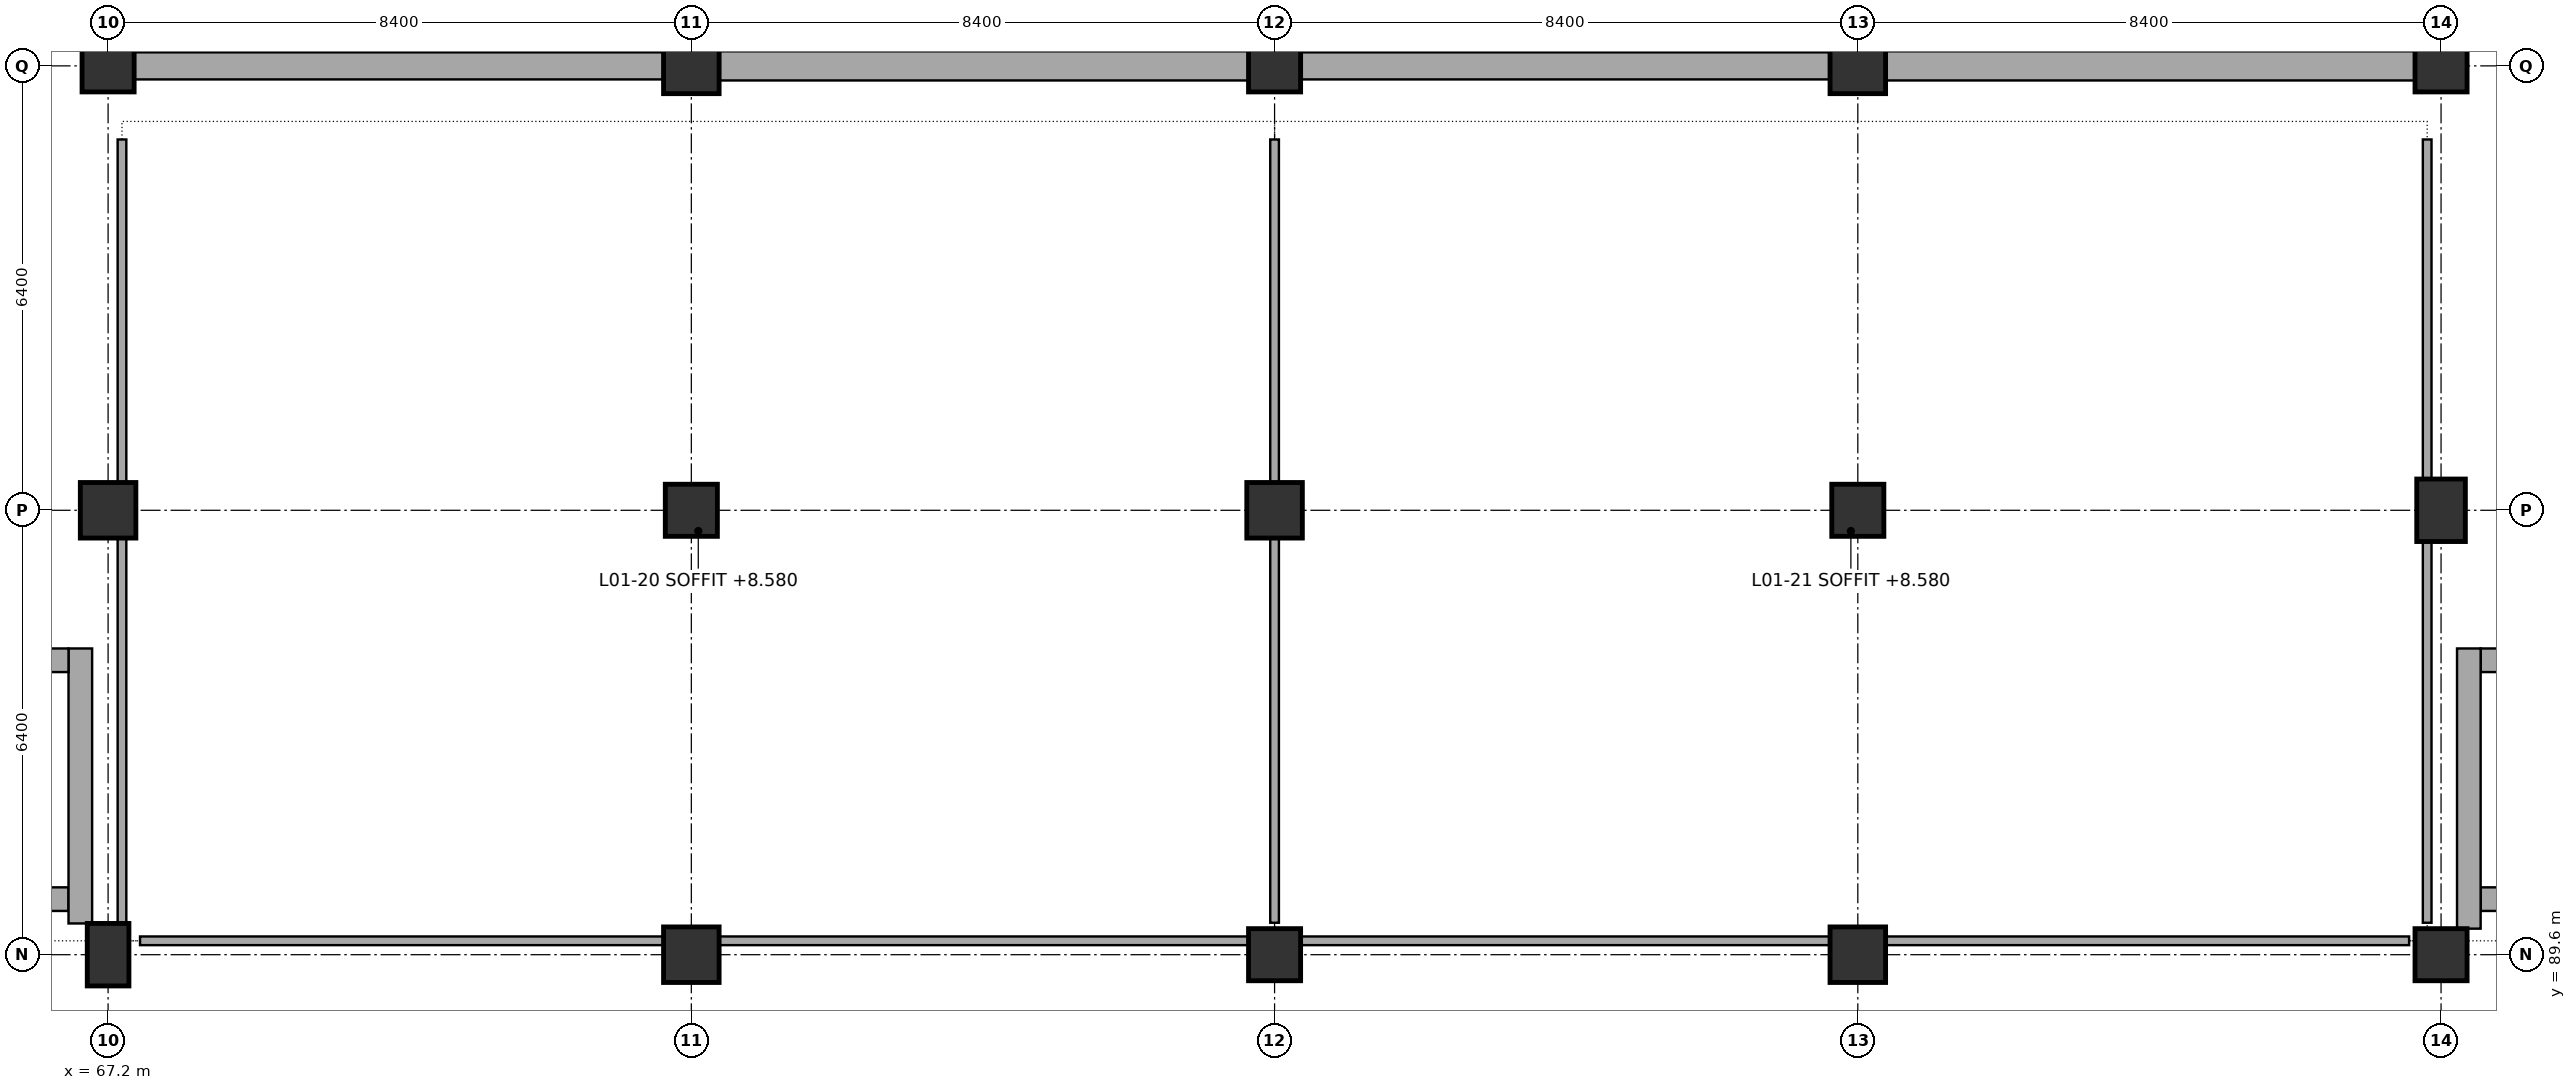
"""IFC4 building model, lengths in metres.
Left out: names, types, materials, properties, quantities, classifications, styles, units other than length and angle.
Written with IfcOpenShell. Run it as: python <this file> out.ifc"""

import sys

from ifc_helpers import new_model, si_unit, direction, frame, frame_2d, origin, origin_2d, place, context, subcontext, project, spatial, rectangle, extrude, element, fill, save


model = new_model("IFC4")
c1 = context("Model", 3, precision=1e-05, world=origin(), true_north=direction((0.0, 1.0)))
c2 = subcontext(c1, "Body", "Model", "MODEL_VIEW")
j1 = project(units=[si_unit("LENGTHUNIT", "METRE"), si_unit("PLANEANGLEUNIT", "RADIAN")], contexts=[c1])
p1 = place(None, origin())
s1 = spatial("IfcSite", under=j1, at=p1, CompositionType="ELEMENT")
p2 = place(p1, origin())
s2 = spatial("IfcBuilding", under=s1, at=p2, CompositionType="ELEMENT")
p3 = place(p2, frame((0.0, 0.0, 4.8)))
s3 = spatial("IfcBuildingStorey", under=s2, at=p3, CompositionType="ELEMENT", Elevation=4.8)
p4 = place(p3, frame((67.2, 89.6, 0.0), z_axis=(0.0, 0.0, 1.0), x_axis=(1.0, 0.0, 0.0)))
e1 = element("IfcColumn", 1, at=p4, inside=s3, PredefinedType="COLUMN", context=c2, shape_type="SweptSolid", body=[
    extrude(rectangle(XDim=0.6, YDim=0.9, at=origin_2d()), origin(), (0.0, 0.0, 1.0), 4.2),
])
p5 = place(p3, frame((67.2, 96.0, 0.0), z_axis=(0.0, 0.0, 1.0), x_axis=(1.0, 0.0, 0.0)))
e2 = element("IfcColumn", 2, at=p5, inside=s3, PredefinedType="COLUMN", context=c2, shape_type="SweptSolid", body=[
    extrude(rectangle(XDim=0.8, YDim=0.8, at=origin_2d()), origin(), (0.0, 0.0, 1.0), 4.2),
])
p6 = place(p3, frame((67.2, 102.4, 0.0), z_axis=(0.0, 0.0, 1.0), x_axis=(1.0, 0.0, 0.0)))
e3 = element("IfcColumn", 3, at=p6, inside=s3, PredefinedType="COLUMN", context=c2, shape_type="SweptSolid", body=[
    extrude(rectangle(XDim=0.75, YDim=0.75, at=origin_2d()), origin(), (0.0, 0.0, 1.0), 4.2),
])
p7 = place(p3, frame((75.6, 89.6, 0.0), z_axis=(0.0, 0.0, 1.0), x_axis=(1.0, 0.0, 0.0)))
e4 = element("IfcColumn", 4, at=p7, inside=s3, PredefinedType="COLUMN", context=c2, shape_type="SweptSolid", body=[
    extrude(rectangle(XDim=0.8, YDim=0.8, at=origin_2d()), origin(), (0.0, 0.0, 1.0), 4.2),
])
p8 = place(p3, frame((75.6, 96.0, 0.0), z_axis=(0.0, 0.0, 1.0), x_axis=(1.0, 0.0, 0.0)))
e5 = element("IfcColumn", 5, at=p8, inside=s3, PredefinedType="COLUMN", context=c2, shape_type="SweptSolid", body=[
    extrude(rectangle(XDim=0.75, YDim=0.75, at=origin_2d()), origin(), (0.0, 0.0, 1.0), 4.2),
])
p9 = place(p3, frame((75.6, 102.4, 0.0), z_axis=(0.0, 0.0, 1.0), x_axis=(1.0, 0.0, 0.0)))
e6 = element("IfcColumn", 6, at=p9, inside=s3, PredefinedType="COLUMN", context=c2, shape_type="SweptSolid", body=[
    extrude(rectangle(XDim=0.8, YDim=0.8, at=origin_2d()), origin(), (0.0, 0.0, 1.0), 4.2),
])
p10 = place(p3, frame((84.0, 89.6, 0.0), z_axis=(0.0, 0.0, 1.0), x_axis=(1.0, 0.0, 0.0)))
e7 = element("IfcColumn", 7, at=p10, inside=s3, PredefinedType="COLUMN", context=c2, shape_type="SweptSolid", body=[
    extrude(rectangle(XDim=0.75, YDim=0.75, at=origin_2d()), origin(), (0.0, 0.0, 1.0), 4.2),
])
p11 = place(p3, frame((84.0, 96.0, 0.0), z_axis=(0.0, 0.0, 1.0), x_axis=(1.0, 0.0, 0.0)))
e8 = element("IfcColumn", 8, at=p11, inside=s3, PredefinedType="COLUMN", context=c2, shape_type="SweptSolid", body=[
    extrude(rectangle(XDim=0.8, YDim=0.8, at=origin_2d()), origin(), (0.0, 0.0, 1.0), 4.2),
])
p12 = place(p3, frame((84.0, 102.4, 0.0), z_axis=(0.0, 0.0, 1.0), x_axis=(1.0, 0.0, 0.0)))
e9 = element("IfcColumn", 9, at=p12, inside=s3, PredefinedType="COLUMN", context=c2, shape_type="SweptSolid", body=[
    extrude(rectangle(XDim=0.75, YDim=0.75, at=origin_2d()), origin(), (0.0, 0.0, 1.0), 4.2),
])
p13 = place(p3, frame((92.4, 89.6, 0.0), z_axis=(0.0, 0.0, 1.0), x_axis=(1.0, 0.0, 0.0)))
e10 = element("IfcColumn", 10, at=p13, inside=s3, PredefinedType="COLUMN", context=c2, shape_type="SweptSolid", body=[
    extrude(rectangle(XDim=0.8, YDim=0.8, at=origin_2d()), origin(), (0.0, 0.0, 1.0), 4.2),
])
p14 = place(p3, frame((92.4, 96.0, 0.0), z_axis=(0.0, 0.0, 1.0), x_axis=(1.0, 0.0, 0.0)))
e11 = element("IfcColumn", 11, at=p14, inside=s3, PredefinedType="COLUMN", context=c2, shape_type="SweptSolid", body=[
    extrude(rectangle(XDim=0.75, YDim=0.75, at=origin_2d()), origin(), (0.0, 0.0, 1.0), 4.2),
])
p15 = place(p3, frame((92.4, 102.4, 0.0), z_axis=(0.0, 0.0, 1.0), x_axis=(1.0, 0.0, 0.0)))
e12 = element("IfcColumn", 12, at=p15, inside=s3, PredefinedType="COLUMN", context=c2, shape_type="SweptSolid", body=[
    extrude(rectangle(XDim=0.8, YDim=0.8, at=origin_2d()), origin(), (0.0, 0.0, 1.0), 4.2),
])
p16 = place(p3, frame((100.8, 89.6, 0.0), z_axis=(0.0, 0.0, 1.0), x_axis=(1.0, 0.0, 0.0)))
e13 = element("IfcColumn", 13, at=p16, inside=s3, PredefinedType="COLUMN", context=c2, shape_type="SweptSolid", body=[
    extrude(rectangle(XDim=0.75, YDim=0.75, at=origin_2d()), origin(), (0.0, 0.0, 1.0), 4.2),
])
p17 = place(p3, frame((100.8, 96.0, 0.0), z_axis=(0.0, 0.0, 1.0), x_axis=(1.0, 0.0, 0.0)))
e14 = element("IfcColumn", 14, at=p17, inside=s3, PredefinedType="COLUMN", context=c2, shape_type="SweptSolid", body=[
    extrude(rectangle(XDim=0.7, YDim=0.9, at=origin_2d()), origin(), (0.0, 0.0, 1.0), 4.2),
])
p18 = place(p3, frame((100.8, 102.4, 0.0), z_axis=(0.0, 0.0, 1.0), x_axis=(1.0, 0.0, 0.0)))
e15 = element("IfcColumn", 15, at=p18, inside=s3, PredefinedType="COLUMN", context=c2, shape_type="SweptSolid", body=[
    extrude(rectangle(XDim=0.75, YDim=0.75, at=origin_2d()), origin(), (0.0, 0.0, 1.0), 4.2),
])
p19 = place(p3, frame((67.2, 108.8, 0.0), z_axis=(0.0, 0.0, 1.0), x_axis=(0.0, -1.0, 0.0)))
e16 = element("IfcWall", 16, at=p19, inside=s3, PredefinedType="STANDARD", context=c2, shape_type="SweptSolid", body=[
    extrude(rectangle(XDim=6.4, YDim=0.42, at=frame_2d((3.2, 0.0))), origin(), (0.0, 0.0, 1.0), 3.84),
])
p20 = place(p19, frame((2.45, 0.0, 0.8)))
e17 = element("IfcOpeningElement", 17, at=p20, cuts=e16, PredefinedType="OPENING", context=c2, shape_type="SweptSolid", body=[
    extrude(rectangle(XDim=1.5, YDim=1.45, at=frame_2d((0.75, 0.725))), frame((0.0, 0.22, 0.0), z_axis=(0.0, -1.0, 0.0), x_axis=(1.0, 0.0, 0.0)), (0.0, 0.0, 1.0), 0.44),
])
p21 = place(p3, frame((67.2, 102.4, 0.0), z_axis=(0.0, 0.0, 1.0), x_axis=(1.0, 0.0, 0.0)))
e18 = element("IfcWall", 18, at=p21, inside=s3, PredefinedType="STANDARD", context=c2, shape_type="SweptSolid", body=[
    extrude(rectangle(XDim=8.4, YDim=0.39, at=frame_2d((4.2, 0.0))), origin(), (0.0, 0.0, 1.0), 3.04),
])
p22 = place(p21, frame((3.3, 0.0, 0.8)))
e19 = element("IfcOpeningElement", 19, at=p22, cuts=e18, PredefinedType="OPENING", context=c2, shape_type="SweptSolid", body=[
    extrude(rectangle(XDim=1.8, YDim=1.45, at=frame_2d((0.9, 0.725))), frame((0.0, 0.205, 0.0), z_axis=(0.0, -1.0, 0.0), x_axis=(1.0, 0.0, 0.0)), (0.0, 0.0, 1.0), 0.41),
])
p23 = place(p3, frame((75.6, 102.4, 0.0), z_axis=(0.0, 0.0, 1.0), x_axis=(1.0, 0.0, 0.0)))
e20 = element("IfcWall", 20, at=p23, inside=s3, PredefinedType="STANDARD", context=c2, shape_type="SweptSolid", body=[
    extrude(rectangle(XDim=8.4, YDim=0.42, at=frame_2d((4.2, 0.0))), origin(), (0.0, 0.0, 1.0), 3.84),
])
p24 = place(p23, frame((3.15, 0.0, 0.8)))
e21 = element("IfcOpeningElement", 21, at=p24, cuts=e20, PredefinedType="OPENING", context=c2, shape_type="SweptSolid", body=[
    extrude(rectangle(XDim=2.1, YDim=1.45, at=frame_2d((1.05, 0.725))), frame((0.0, 0.22, 0.0), z_axis=(0.0, -1.0, 0.0), x_axis=(1.0, 0.0, 0.0)), (0.0, 0.0, 1.0), 0.44),
])
p25 = place(p3, frame((84.0, 102.4, 0.0), z_axis=(0.0, 0.0, 1.0), x_axis=(1.0, 0.0, 0.0)))
e22 = element("IfcWall", 22, at=p25, inside=s3, PredefinedType="STANDARD", context=c2, shape_type="SweptSolid", body=[
    extrude(rectangle(XDim=8.4, YDim=0.39, at=frame_2d((4.2, 0.0))), origin(), (0.0, 0.0, 1.0), 3.24),
])
p26 = place(p25, frame((3.0, 0.0, 0.8)))
e23 = element("IfcOpeningElement", 23, at=p26, cuts=e22, PredefinedType="OPENING", context=c2, shape_type="SweptSolid", body=[
    extrude(rectangle(XDim=2.4, YDim=1.45, at=frame_2d((1.2, 0.725))), frame((0.0, 0.205, 0.0), z_axis=(0.0, -1.0, 0.0), x_axis=(1.0, 0.0, 0.0)), (0.0, 0.0, 1.0), 0.41),
])
p27 = place(p3, frame((92.4, 102.4, 0.0), z_axis=(0.0, 0.0, 1.0), x_axis=(1.0, 0.0, 0.0)))
e24 = element("IfcWall", 24, at=p27, inside=s3, PredefinedType="STANDARD", context=c2, shape_type="SweptSolid", body=[
    extrude(rectangle(XDim=8.4, YDim=0.42, at=frame_2d((4.2, 0.0))), origin(), (0.0, 0.0, 1.0), 3.84),
])
p28 = place(p27, frame((2.8, 0.0, 0.8)))
e25 = element("IfcOpeningElement", 25, at=p28, cuts=e24, PredefinedType="OPENING", context=c2, shape_type="SweptSolid", body=[
    extrude(rectangle(XDim=2.8, YDim=1.6, at=frame_2d((1.4, 0.8))), frame((0.0, 0.22, 0.0), z_axis=(0.0, -1.0, 0.0), x_axis=(1.0, 0.0, 0.0)), (0.0, 0.0, 1.0), 0.44),
])
p29 = place(p3, frame((100.8, 102.4, 0.0), z_axis=(0.0, 0.0, 1.0), x_axis=(0.0, 1.0, 0.0)))
e26 = element("IfcWall", 26, at=p29, inside=s3, PredefinedType="STANDARD", context=c2, shape_type="SweptSolid", body=[
    extrude(rectangle(XDim=6.4, YDim=0.39, at=frame_2d((3.2, 0.0))), origin(), (0.0, 0.0, 1.0), 2.79),
])
p30 = place(p29, frame((1.6, 0.0, 0.8)))
e27 = element("IfcOpeningElement", 27, at=p30, cuts=e26, PredefinedType="OPENING", context=c2, shape_type="SweptSolid", body=[
    extrude(rectangle(XDim=3.2, YDim=1.6, at=frame_2d((1.6, 0.8))), frame((0.0, 0.205, 0.0), z_axis=(0.0, -1.0, 0.0), x_axis=(1.0, 0.0, 0.0)), (0.0, 0.0, 1.0), 0.41),
])
p31 = place(p3, frame((59.37, 90.4, 0.0), z_axis=(0.0, 0.0, 1.0), x_axis=(1.0, 0.0, 0.0)))
e28 = element("IfcWall", 28, at=p31, inside=s3, PredefinedType="SHEAR", context=c2, shape_type="SweptSolid", body=[
    extrude(rectangle(XDim=7.26, YDim=0.34, at=frame_2d((3.63, 0.0))), origin(), (0.0, 0.0, 1.0), 4.2),
])
p32 = place(p3, frame((66.8, 90.05, 0.0), z_axis=(0.0, 0.0, 1.0), x_axis=(0.0, 1.0, 0.0)))
e29 = element("IfcWall", 29, at=p32, inside=s3, PredefinedType="SHEAR", context=c2, shape_type="SweptSolid", body=[
    extrude(rectangle(XDim=3.96, YDim=0.34, at=frame_2d((1.98, 0.0))), origin(), (0.0, 0.0, 1.0), 4.2),
])
for number, where, z_axis, x_axis in (
    (30, (66.63, 93.84, 0.0), (0.0, 0.0, 1.0), (-1.0, 0.0, 0.0)),
    (31, (101.37, 90.4, 0.0), (0.0, 0.0, 1.0), (1.0, 0.0, 0.0)),
    (32, (108.63, 93.84, 0.0), (0.0, 0.0, 1.0), (-1.0, 0.0, 0.0)),
):
    element("IfcWall", number, at=place(p3, frame(where, z_axis=z_axis, x_axis=x_axis)), inside=s3, PredefinedType="SHEAR", context=c2, shape_type="SweptSolid", body=[
        extrude(rectangle(XDim=7.26, YDim=0.34, at=frame_2d((3.63, 0.0))), origin(), (0.0, 0.0, 1.0), 4.2),
    ])
p33 = place(p3, frame((101.2, 94.01, 0.0), z_axis=(0.0, 0.0, 1.0), x_axis=(0.0, -1.0, 0.0)))
e33 = element("IfcWall", 33, at=p33, inside=s3, PredefinedType="SHEAR", context=c2, shape_type="SweptSolid", body=[
    extrude(rectangle(XDim=4.035, YDim=0.34, at=frame_2d((2.018, 0.0))), origin(), (0.0, 0.0, 1.0), 4.2),
])
p34 = place(p33, frame((1.367, 0.0, 0.0)))
e34 = element("IfcOpeningElement", 34, at=p34, cuts=e33, PredefinedType="OPENING", context=c2, shape_type="SweptSolid", body=[
    extrude(rectangle(XDim=1.3, YDim=2.15, at=frame_2d((0.65, 1.075))), frame((0.0, 0.18, 0.0), z_axis=(0.0, -1.0, 0.0), x_axis=(1.0, 0.0, 0.0)), (0.0, 0.0, 1.0), 0.36),
])
p35 = place(p3, frame((67.66, 89.8, 0.0), z_axis=(0.0, 0.0, 1.0), x_axis=(1.0, 0.0, 0.0)))
e35 = element("IfcWall", 35, at=p35, inside=s3, PredefinedType="PARTITIONING", context=c2, shape_type="SweptSolid", body=[
    extrude(rectangle(XDim=16.08, YDim=0.125, at=frame_2d((8.04, 0.0))), origin(), (0.0, 0.0, 1.0), 3.015),
])
p36 = place(p35, frame((9.15, 0.0, 0.0)))
e36 = element("IfcOpeningElement", 36, at=p36, cuts=e35, PredefinedType="OPENING", context=c2, shape_type="SweptSolid", body=[
    extrude(rectangle(XDim=0.98, YDim=2.1, at=frame_2d((0.49, 1.05))), frame((0.0, 0.073, 0.0), z_axis=(0.0, -1.0, 0.0), x_axis=(1.0, 0.0, 0.0)), (0.0, 0.0, 1.0), 0.145),
])
p37 = place(p3, frame((84.0, 90.06, 0.0), z_axis=(0.0, 0.0, 1.0), x_axis=(0.0, 1.0, 0.0)))
e37 = element("IfcWall", 37, at=p37, inside=s3, PredefinedType="PARTITIONING", context=c2, shape_type="SweptSolid", body=[
    extrude(rectangle(XDim=11.28, YDim=0.125, at=frame_2d((5.64, 0.0))), origin(), (0.0, 0.0, 1.0), 2.915),
])
p38 = place(p3, frame((67.4, 101.34, 0.0), z_axis=(0.0, 0.0, 1.0), x_axis=(0.0, -1.0, 0.0)))
e38 = element("IfcWall", 38, at=p38, inside=s3, PredefinedType="PARTITIONING", context=c2, shape_type="SweptSolid", body=[
    extrude(rectangle(XDim=11.28, YDim=0.125, at=frame_2d((5.64, 0.0))), origin(), (0.0, 0.0, 1.0), 2.965),
])
p39 = place(p3, frame((84.26, 89.8, 0.0), z_axis=(0.0, 0.0, 1.0), x_axis=(1.0, 0.0, 0.0)))
e39 = element("IfcWall", 39, at=p39, inside=s3, PredefinedType="PARTITIONING", context=c2, shape_type="SweptSolid", body=[
    extrude(rectangle(XDim=16.08, YDim=0.125, at=frame_2d((8.04, 0.0))), origin(), (0.0, 0.0, 1.0), 2.915),
])
p40 = place(p39, frame((9.15, 0.0, 0.0)))
e40 = element("IfcOpeningElement", 40, at=p40, cuts=e39, PredefinedType="OPENING", context=c2, shape_type="SweptSolid", body=[
    extrude(rectangle(XDim=0.98, YDim=2.1, at=frame_2d((0.49, 1.05))), frame((0.0, 0.073, 0.0), z_axis=(0.0, -1.0, 0.0), x_axis=(1.0, 0.0, 0.0)), (0.0, 0.0, 1.0), 0.145),
])
p41 = place(p3, frame((100.6, 90.06, 0.0), z_axis=(0.0, 0.0, 1.0), x_axis=(0.0, 1.0, 0.0)))
e41 = element("IfcWall", 41, at=p41, inside=s3, PredefinedType="PARTITIONING", context=c2, shape_type="SweptSolid", body=[
    extrude(rectangle(XDim=11.28, YDim=0.125, at=frame_2d((5.64, 0.0))), origin(), (0.0, 0.0, 1.0), 2.865),
])
p42 = place(p22, origin())
e42 = element("IfcWindow", 42, at=p42, inside=s3, PartitioningType="SINGLE_PANEL", PredefinedType="WINDOW", context=c2, shape_type="SweptSolid", body=[
    extrude(rectangle(XDim=1.8, YDim=1.45, at=frame_2d((0.9, 0.725))), frame((0.0, 0.03, 0.0), z_axis=(0.0, -1.0, 0.0), x_axis=(1.0, 0.0, 0.0)), (0.0, 0.0, 1.0), 0.06),
])
fill(e19, e42)
p43 = place(p24, origin())
e43 = element("IfcWindow", 43, at=p43, inside=s3, PartitioningType="SINGLE_PANEL", PredefinedType="WINDOW", context=c2, shape_type="SweptSolid", body=[
    extrude(rectangle(XDim=2.1, YDim=1.45, at=frame_2d((1.05, 0.725))), frame((0.0, 0.03, 0.0), z_axis=(0.0, -1.0, 0.0), x_axis=(1.0, 0.0, 0.0)), (0.0, 0.0, 1.0), 0.06),
])
fill(e21, e43)
p44 = place(p26, origin())
e44 = element("IfcWindow", 44, at=p44, inside=s3, PartitioningType="TRIPLE_PANEL_VERTICAL", PredefinedType="WINDOW", context=c2, shape_type="SweptSolid", body=[
    extrude(rectangle(XDim=2.4, YDim=1.45, at=frame_2d((1.2, 0.725))), frame((0.0, 0.03, 0.0), z_axis=(0.0, -1.0, 0.0), x_axis=(1.0, 0.0, 0.0)), (0.0, 0.0, 1.0), 0.06),
])
fill(e23, e44)
p45 = place(p28, origin())
e45 = element("IfcWindow", 45, at=p45, inside=s3, PartitioningType="TRIPLE_PANEL_VERTICAL", PredefinedType="WINDOW", context=c2, shape_type="SweptSolid", body=[
    extrude(rectangle(XDim=2.8, YDim=1.6, at=frame_2d((1.4, 0.8))), frame((0.0, 0.03, 0.0), z_axis=(0.0, -1.0, 0.0), x_axis=(1.0, 0.0, 0.0)), (0.0, 0.0, 1.0), 0.06),
])
fill(e25, e45)
p46 = place(p34, origin())
e46 = element("IfcDoor", 46, at=p46, inside=s3, OperationType="SINGLE_SWING_LEFT", PredefinedType="DOOR", context=c2, shape_type="SweptSolid", body=[
    extrude(rectangle(XDim=1.3, YDim=2.15, at=frame_2d((0.65, 1.075))), frame((0.0, 0.025, 0.0), z_axis=(0.0, -1.0, 0.0), x_axis=(1.0, 0.0, 0.0)), (0.0, 0.0, 1.0), 0.05),
])
fill(e34, e46)
p47 = place(p36, origin())
e47 = element("IfcDoor", 47, at=p47, inside=s3, OperationType="SINGLE_SWING_LEFT", PredefinedType="DOOR", context=c2, shape_type="SweptSolid", body=[
    extrude(rectangle(XDim=0.98, YDim=2.1, at=frame_2d((0.49, 1.05))), frame((0.0, 0.025, 0.0), z_axis=(0.0, -1.0, 0.0), x_axis=(1.0, 0.0, 0.0)), (0.0, 0.0, 1.0), 0.05),
])
fill(e36, e47)
p48 = place(p40, origin())
e48 = element("IfcDoor", 48, at=p48, inside=s3, OperationType="SINGLE_SWING_RIGHT", PredefinedType="DOOR", context=c2, shape_type="SweptSolid", body=[
    extrude(rectangle(XDim=0.98, YDim=2.1, at=frame_2d((0.49, 1.05))), frame((0.0, 0.025, 0.0), z_axis=(0.0, -1.0, 0.0), x_axis=(1.0, 0.0, 0.0)), (0.0, 0.0, 1.0), 0.05),
])
fill(e40, e48)
save(model, sys.argv[1])
